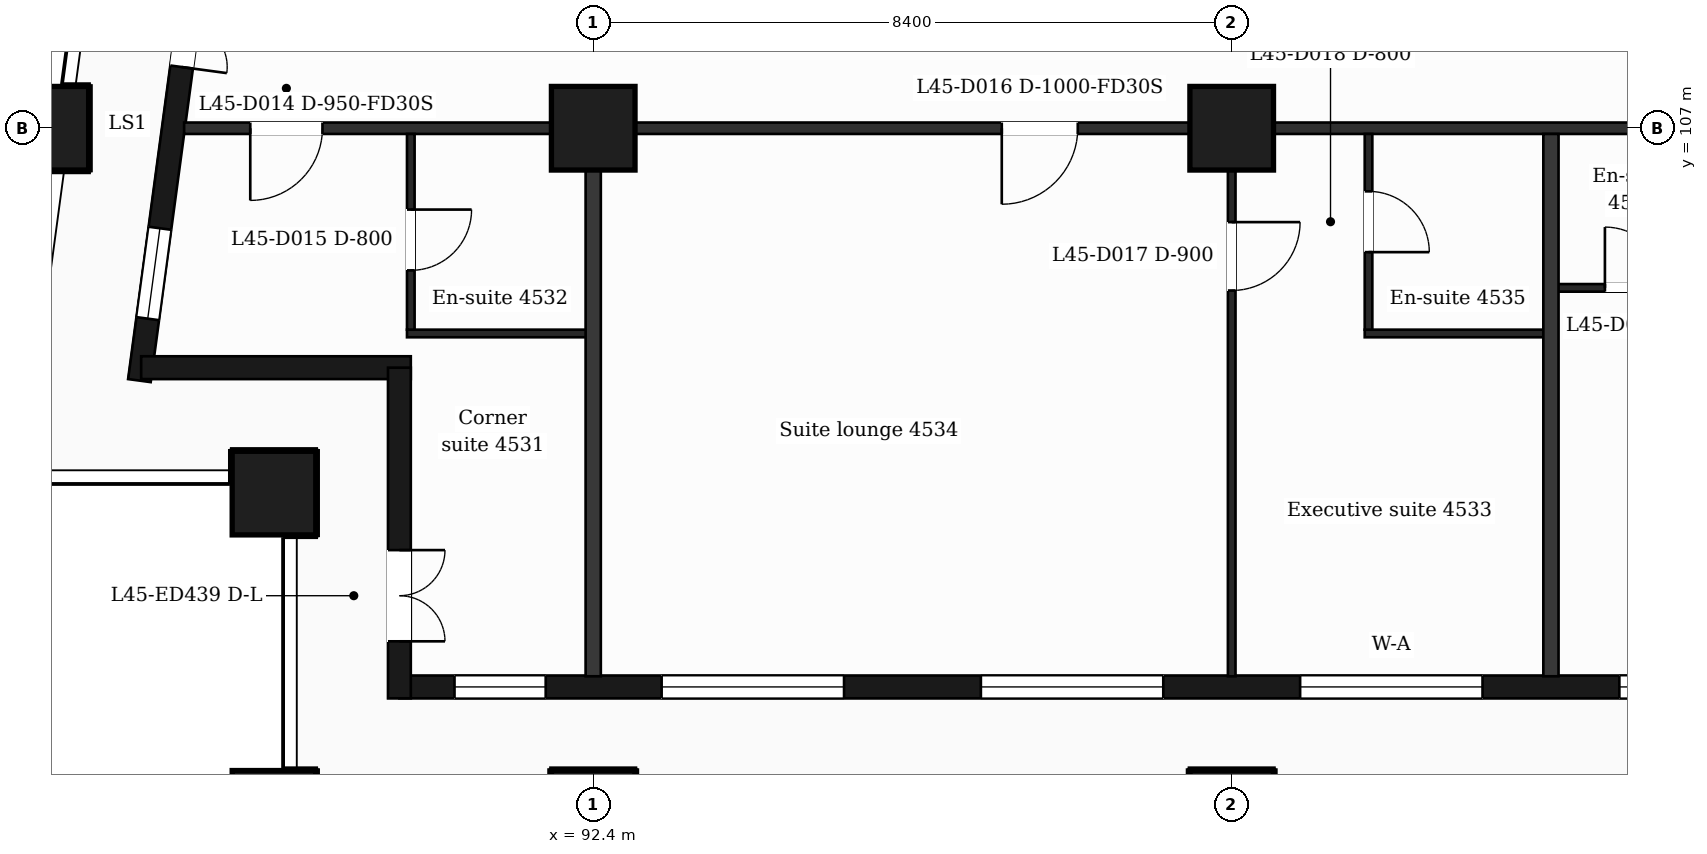
"""IFC4 building model, lengths in metres.
Left out: names, types, materials, properties, quantities, classifications, styles, units other than length and angle.
Written with IfcOpenShell. Run it as: python <this file> out.ifc"""

import sys

from ifc_helpers import new_model, si_unit, direction, frame, frame_2d, origin, origin_2d, place, context, subcontext, project, spatial, rectangle, extrude, element, fill, save


model = new_model("IFC4")
c1 = context("Model", 3, precision=1e-05, world=origin(), true_north=direction((0.0, 1.0)))
c2 = subcontext(c1, "Body", "Model", "MODEL_VIEW")
j1 = project(units=[si_unit("LENGTHUNIT", "METRE"), si_unit("PLANEANGLEUNIT", "RADIAN")], contexts=[c1])
p1 = place(None, origin())
s1 = spatial("IfcSite", under=j1, at=p1, CompositionType="ELEMENT")
p2 = place(p1, origin())
s2 = spatial("IfcBuilding", under=s1, at=p2, CompositionType="ELEMENT")
p3 = place(p2, frame((0.0, 0.0, 188.5)))
s3 = spatial("IfcBuildingStorey", under=s2, at=p3, CompositionType="ELEMENT", Elevation=188.5)
for number, where, z_axis, x_axis in (
    (1, (92.4, 98.0, 0.0), (0.0, 0.0, 1.0), (1.0, 0.0, 0.0)),
    (2, (100.8, 98.0, 0.0), (0.0, 0.0, 1.0), (1.0, 0.0, 0.0)),
    (3, (88.2, 98.0, 0.0), (0.0, 0.0, 1.0), (1.0, 0.0, 0.0)),
    (4, (88.2, 102.2, 0.0), (0.0, 0.0, 1.0), (1.0, 0.0, 0.0)),
    (5, (92.4, 107.0, 0.0), (0.0, 0.0, 1.0), (1.0, 0.0, 0.0)),
    (6, (100.8, 107.0, 0.0), (0.0, 0.0, 1.0), (1.0, 0.0, 0.0)),
    (7, (85.211, 107.0, 0.0), (0.0, 0.0, 1.0), (1.0, 0.0, 0.0)),
):
    element("IfcColumn", number, at=place(p3, frame(where, z_axis=z_axis, x_axis=x_axis)), inside=s3, PredefinedType="COLUMN", context=c2, shape_type="SweptSolid", body=[
        extrude(rectangle(XDim=1.1, YDim=1.1, at=origin_2d()), origin(), (0.0, 0.0, 1.0), 3.7),
    ])
p4 = place(p3, frame((89.85, 99.65, 0.0), z_axis=(0.0, 0.0, 1.0), x_axis=(1.0, 0.0, 0.0)))
e8 = element("IfcWall", 8, at=p4, inside=s3, PredefinedType="SOLIDWALL", context=c2, shape_type="SweptSolid", body=[
    extrude(rectangle(XDim=47.25, YDim=0.3, at=frame_2d((23.625, 0.0))), origin(), (0.0, 0.0, 1.0), 3.25),
])
p5 = place(p4, frame((0.725, 0.0, 0.9)))
e9 = element("IfcOpeningElement", 9, at=p5, cuts=e8, PredefinedType="OPENING", context=c2, shape_type="SweptSolid", body=[
    extrude(rectangle(XDim=1.2, YDim=2.1, at=frame_2d((0.6, 1.05))), frame((0.0, 0.16, 0.0), z_axis=(0.0, -1.0, 0.0), x_axis=(1.0, 0.0, 0.0)), (0.0, 0.0, 1.0), 0.32),
])
p6 = place(p4, frame((3.45, 0.0, 0.9)))
e10 = element("IfcOpeningElement", 10, at=p6, cuts=e8, PredefinedType="OPENING", context=c2, shape_type="SweptSolid", body=[
    extrude(rectangle(XDim=2.4, YDim=2.1, at=frame_2d((1.2, 1.05))), frame((0.0, 0.16, 0.0), z_axis=(0.0, -1.0, 0.0), x_axis=(1.0, 0.0, 0.0)), (0.0, 0.0, 1.0), 0.32),
])
p7 = place(p4, frame((7.65, 0.0, 0.9)))
e11 = element("IfcOpeningElement", 11, at=p7, cuts=e8, PredefinedType="OPENING", context=c2, shape_type="SweptSolid", body=[
    extrude(rectangle(XDim=2.4, YDim=2.1, at=frame_2d((1.2, 1.05))), frame((0.0, 0.16, 0.0), z_axis=(0.0, -1.0, 0.0), x_axis=(1.0, 0.0, 0.0)), (0.0, 0.0, 1.0), 0.32),
])
p8 = place(p4, frame((11.85, 0.0, 0.9)))
e12 = element("IfcOpeningElement", 12, at=p8, cuts=e8, PredefinedType="OPENING", context=c2, shape_type="SweptSolid", body=[
    extrude(rectangle(XDim=2.4, YDim=2.1, at=frame_2d((1.2, 1.05))), frame((0.0, 0.16, 0.0), z_axis=(0.0, -1.0, 0.0), x_axis=(1.0, 0.0, 0.0)), (0.0, 0.0, 1.0), 0.32),
])
p9 = place(p4, frame((16.05, 0.0, 0.9)))
e13 = element("IfcOpeningElement", 13, at=p9, cuts=e8, PredefinedType="OPENING", context=c2, shape_type="SweptSolid", body=[
    extrude(rectangle(XDim=2.4, YDim=2.1, at=frame_2d((1.2, 1.05))), frame((0.0, 0.16, 0.0), z_axis=(0.0, -1.0, 0.0), x_axis=(1.0, 0.0, 0.0)), (0.0, 0.0, 1.0), 0.32),
])
p10 = place(p4, frame((20.25, 0.0, 0.9)))
e14 = element("IfcOpeningElement", 14, at=p10, cuts=e8, PredefinedType="OPENING", context=c2, shape_type="SweptSolid", body=[
    extrude(rectangle(XDim=2.4, YDim=2.1, at=frame_2d((1.2, 1.05))), frame((0.0, 0.16, 0.0), z_axis=(0.0, -1.0, 0.0), x_axis=(1.0, 0.0, 0.0)), (0.0, 0.0, 1.0), 0.32),
])
p11 = place(p4, frame((25.05, 0.0, 0.9)))
e15 = element("IfcOpeningElement", 15, at=p11, cuts=e8, PredefinedType="OPENING", context=c2, shape_type="SweptSolid", body=[
    extrude(rectangle(XDim=1.2, YDim=2.1, at=frame_2d((0.6, 1.05))), frame((0.0, 0.16, 0.0), z_axis=(0.0, -1.0, 0.0), x_axis=(1.0, 0.0, 0.0)), (0.0, 0.0, 1.0), 0.32),
])
p12 = place(p4, frame((29.25, 0.0, 0.9)))
e16 = element("IfcOpeningElement", 16, at=p12, cuts=e8, PredefinedType="OPENING", context=c2, shape_type="SweptSolid", body=[
    extrude(rectangle(XDim=1.2, YDim=2.1, at=frame_2d((0.6, 1.05))), frame((0.0, 0.16, 0.0), z_axis=(0.0, -1.0, 0.0), x_axis=(1.0, 0.0, 0.0)), (0.0, 0.0, 1.0), 0.32),
])
p13 = place(p4, frame((32.55, 0.0, 0.0)))
e17 = element("IfcOpeningElement", 17, at=p13, cuts=e8, PredefinedType="OPENING", context=c2, shape_type="SweptSolid", body=[
    extrude(rectangle(XDim=1.2, YDim=2.4, at=frame_2d((0.6, 1.2))), frame((0.0, 0.16, 0.0), z_axis=(0.0, -1.0, 0.0), x_axis=(1.0, 0.0, 0.0)), (0.0, 0.0, 1.0), 0.32),
])
p14 = place(p4, frame((34.35, 0.0, 0.9)))
e18 = element("IfcOpeningElement", 18, at=p14, cuts=e8, PredefinedType="OPENING", context=c2, shape_type="SweptSolid", body=[
    extrude(rectangle(XDim=1.2, YDim=2.1, at=frame_2d((0.6, 1.05))), frame((0.0, 0.16, 0.0), z_axis=(0.0, -1.0, 0.0), x_axis=(1.0, 0.0, 0.0)), (0.0, 0.0, 1.0), 0.32),
])
p15 = place(p4, frame((37.05, 0.0, 0.9)))
e19 = element("IfcOpeningElement", 19, at=p15, cuts=e8, PredefinedType="OPENING", context=c2, shape_type="SweptSolid", body=[
    extrude(rectangle(XDim=2.4, YDim=2.1, at=frame_2d((1.2, 1.05))), frame((0.0, 0.16, 0.0), z_axis=(0.0, -1.0, 0.0), x_axis=(1.0, 0.0, 0.0)), (0.0, 0.0, 1.0), 0.32),
])
p16 = place(p4, frame((40.95, 0.0, 0.0)))
e20 = element("IfcOpeningElement", 20, at=p16, cuts=e8, PredefinedType="OPENING", context=c2, shape_type="SweptSolid", body=[
    extrude(rectangle(XDim=1.2, YDim=2.4, at=frame_2d((0.6, 1.2))), frame((0.0, 0.16, 0.0), z_axis=(0.0, -1.0, 0.0), x_axis=(1.0, 0.0, 0.0)), (0.0, 0.0, 1.0), 0.32),
])
p17 = place(p4, frame((42.75, 0.0, 0.9)))
e21 = element("IfcOpeningElement", 21, at=p17, cuts=e8, PredefinedType="OPENING", context=c2, shape_type="SweptSolid", body=[
    extrude(rectangle(XDim=1.2, YDim=2.1, at=frame_2d((0.6, 1.05))), frame((0.0, 0.16, 0.0), z_axis=(0.0, -1.0, 0.0), x_axis=(1.0, 0.0, 0.0)), (0.0, 0.0, 1.0), 0.32),
])
p18 = place(p4, frame((45.25, 0.0, 0.9)))
e22 = element("IfcOpeningElement", 22, at=p18, cuts=e8, PredefinedType="OPENING", context=c2, shape_type="SweptSolid", body=[
    extrude(rectangle(XDim=1.2, YDim=2.1, at=frame_2d((0.6, 1.05))), frame((0.0, 0.16, 0.0), z_axis=(0.0, -1.0, 0.0), x_axis=(1.0, 0.0, 0.0)), (0.0, 0.0, 1.0), 0.32),
])
p19 = place(p3, frame((87.334, 110.4, 0.0), z_axis=(0.0, 0.0, 1.0), x_axis=(-0.133437175554, -0.991057273915, 0.0)))
e23 = element("IfcWall", 23, at=p19, inside=s3, PredefinedType="SOLIDWALL", context=c2, shape_type="SweptSolid", body=[
    extrude(rectangle(XDim=6.781, YDim=0.3, at=frame_2d((3.39, 0.0))), origin(), (0.0, 0.0, 1.0), 3.25),
])
p20 = place(p19, frame((1.418, 0.0, 0.0)))
e24 = element("IfcOpeningElement", 24, at=p20, cuts=e23, PredefinedType="OPENING", context=c2, shape_type="SweptSolid", body=[
    extrude(rectangle(XDim=1.2, YDim=2.4, at=frame_2d((0.6, 1.2))), frame((0.0, 0.16, 0.0), z_axis=(0.0, -1.0, 0.0), x_axis=(1.0, 0.0, 0.0)), (0.0, 0.0, 1.0), 0.32),
])
p21 = place(p19, frame((4.758, 0.0, 0.9)))
e25 = element("IfcOpeningElement", 25, at=p21, cuts=e23, PredefinedType="OPENING", context=c2, shape_type="SweptSolid", body=[
    extrude(rectangle(XDim=1.2, YDim=2.1, at=frame_2d((0.6, 1.05))), frame((0.0, 0.16, 0.0), z_axis=(0.0, -1.0, 0.0), x_axis=(1.0, 0.0, 0.0)), (0.0, 0.0, 1.0), 0.32),
])
p22 = place(p3, frame((86.452, 103.85, 0.0), z_axis=(0.0, 0.0, 1.0), x_axis=(1.0, 0.0, 0.0)))
e26 = element("IfcWall", 26, at=p22, inside=s3, PredefinedType="SOLIDWALL", context=c2, shape_type="SweptSolid", body=[
    extrude(rectangle(XDim=3.548, YDim=0.3, at=frame_2d((1.774, 0.0))), origin(), (0.0, 0.0, 1.0), 3.25),
])
p23 = place(p3, frame((89.85, 103.85, 0.0), z_axis=(0.0, 0.0, 1.0), x_axis=(0.0, -1.0, 0.0)))
e27 = element("IfcWall", 27, at=p23, inside=s3, PredefinedType="SOLIDWALL", context=c2, shape_type="SweptSolid", body=[
    extrude(rectangle(XDim=4.35, YDim=0.3, at=frame_2d((2.175, 0.0))), origin(), (0.0, 0.0, 1.0), 3.25),
])
p24 = place(p23, frame((2.4, 0.0, 0.0)))
e28 = element("IfcOpeningElement", 28, at=p24, cuts=e27, PredefinedType="OPENING", context=c2, shape_type="SweptSolid", body=[
    extrude(rectangle(XDim=1.2, YDim=2.4, at=frame_2d((0.6, 1.2))), frame((0.0, 0.16, 0.0), z_axis=(0.0, -1.0, 0.0), x_axis=(1.0, 0.0, 0.0)), (0.0, 0.0, 1.0), 0.32),
])
for number, where, z_axis, x_axis in (
    (29, (89.95, 104.3, 0.0), (0.0, 0.0, 1.0), (1.0, 0.0, 0.0)),
    (30, (102.55, 104.3, 0.0), (0.0, 0.0, 1.0), (1.0, 0.0, 0.0)),
):
    element("IfcWall", number, at=place(p3, frame(where, z_axis=z_axis, x_axis=x_axis)), inside=s3, PredefinedType="PARTITIONING", context=c2, shape_type="SweptSolid", body=[
        extrude(rectangle(XDim=2.45, YDim=0.1, at=frame_2d((1.225, 0.0))), origin(), (0.0, 0.0, 1.0), 3.25),
    ])
p25 = place(p3, frame((105.0, 104.9, 0.0), z_axis=(0.0, 0.0, 1.0), x_axis=(1.0, 0.0, 0.0)))
e31 = element("IfcWall", 31, at=p25, inside=s3, PredefinedType="PARTITIONING", context=c2, shape_type="SweptSolid", body=[
    extrude(rectangle(XDim=2.15, YDim=0.1, at=frame_2d((1.075, 0.0))), origin(), (0.0, 0.0, 1.0), 3.25),
])
p26 = place(p25, frame((0.71, 0.0, 0.0)))
e32 = element("IfcOpeningElement", 32, at=p26, cuts=e31, PredefinedType="OPENING", context=c2, shape_type="SweptSolid", body=[
    extrude(rectangle(XDim=0.8, YDim=2.1, at=frame_2d((0.4, 1.05))), frame((0.0, 0.06, 0.0), z_axis=(0.0, -1.0, 0.0), x_axis=(1.0, 0.0, 0.0)), (0.0, 0.0, 1.0), 0.12),
])
p27 = place(p3, frame((87.018, 107.0, 0.0), z_axis=(0.0, 0.0, 1.0), x_axis=(1.0, 0.0, 0.0)))
e33 = element("IfcWall", 33, at=p27, inside=s3, PredefinedType="PARTITIONING", context=c2, shape_type="SweptSolid", body=[
    extrude(rectangle(XDim=52.765, YDim=0.15, at=frame_2d((26.382, 0.0))), origin(), (0.0, 0.0, 1.0), 3.25),
])
p28 = place(p27, frame((0.87, 0.0, 0.0)))
e34 = element("IfcOpeningElement", 34, at=p28, cuts=e33, PredefinedType="OPENING", context=c2, shape_type="SweptSolid", body=[
    extrude(rectangle(XDim=0.95, YDim=2.1, at=frame_2d((0.475, 1.05))), frame((0.0, 0.085, 0.0), z_axis=(0.0, -1.0, 0.0), x_axis=(1.0, 0.0, 0.0)), (0.0, 0.0, 1.0), 0.17),
])
p29 = place(p27, frame((10.757, 0.0, 0.0)))
e35 = element("IfcOpeningElement", 35, at=p29, cuts=e33, PredefinedType="OPENING", context=c2, shape_type="SweptSolid", body=[
    extrude(rectangle(XDim=1.0, YDim=2.1, at=frame_2d((0.5, 1.05))), frame((0.0, 0.085, 0.0), z_axis=(0.0, -1.0, 0.0), x_axis=(1.0, 0.0, 0.0)), (0.0, 0.0, 1.0), 0.17),
])
p30 = place(p27, frame((20.432, 0.0, 0.0)))
e36 = element("IfcOpeningElement", 36, at=p30, cuts=e33, PredefinedType="OPENING", context=c2, shape_type="SweptSolid", body=[
    extrude(rectangle(XDim=0.95, YDim=2.1, at=frame_2d((0.475, 1.05))), frame((0.0, 0.085, 0.0), z_axis=(0.0, -1.0, 0.0), x_axis=(1.0, 0.0, 0.0)), (0.0, 0.0, 1.0), 0.17),
])
p31 = place(p27, frame((27.752, 0.0, 0.0)))
e37 = element("IfcOpeningElement", 37, at=p31, cuts=e33, PredefinedType="OPENING", context=c2, shape_type="SweptSolid", body=[
    extrude(rectangle(XDim=0.95, YDim=2.1, at=frame_2d((0.475, 1.05))), frame((0.0, 0.085, 0.0), z_axis=(0.0, -1.0, 0.0), x_axis=(1.0, 0.0, 0.0)), (0.0, 0.0, 1.0), 0.17),
])
p32 = place(p27, frame((33.557, 0.0, 0.0)))
e38 = element("IfcOpeningElement", 38, at=p32, cuts=e33, PredefinedType="OPENING", context=c2, shape_type="SweptSolid", body=[
    extrude(rectangle(XDim=0.95, YDim=2.1, at=frame_2d((0.475, 1.05))), frame((0.0, 0.085, 0.0), z_axis=(0.0, -1.0, 0.0), x_axis=(1.0, 0.0, 0.0)), (0.0, 0.0, 1.0), 0.17),
])
p33 = place(p27, frame((35.057, 0.0, 0.0)))
e39 = element("IfcOpeningElement", 39, at=p33, cuts=e33, PredefinedType="OPENING", context=c2, shape_type="SweptSolid", body=[
    extrude(rectangle(XDim=0.95, YDim=2.1, at=frame_2d((0.475, 1.05))), frame((0.0, 0.085, 0.0), z_axis=(0.0, -1.0, 0.0), x_axis=(1.0, 0.0, 0.0)), (0.0, 0.0, 1.0), 0.17),
])
p34 = place(p27, frame((45.407, 0.0, 0.0)))
e40 = element("IfcOpeningElement", 40, at=p34, cuts=e33, PredefinedType="OPENING", context=c2, shape_type="SweptSolid", body=[
    extrude(rectangle(XDim=1.0, YDim=2.1, at=frame_2d((0.5, 1.05))), frame((0.0, 0.085, 0.0), z_axis=(0.0, -1.0, 0.0), x_axis=(1.0, 0.0, 0.0)), (0.0, 0.0, 1.0), 0.17),
])
p35 = place(p27, frame((49.285, 0.0, 0.0)))
e41 = element("IfcOpeningElement", 41, at=p35, cuts=e33, PredefinedType="OPENING", context=c2, shape_type="SweptSolid", body=[
    extrude(rectangle(XDim=0.95, YDim=2.1, at=frame_2d((0.475, 1.05))), frame((0.0, 0.085, 0.0), z_axis=(0.0, -1.0, 0.0), x_axis=(1.0, 0.0, 0.0)), (0.0, 0.0, 1.0), 0.17),
])
p36 = place(p3, frame((90.0, 104.35, 0.0), z_axis=(0.0, 0.0, 1.0), x_axis=(0.0, 1.0, 0.0)))
e42 = element("IfcWall", 42, at=p36, inside=s3, PredefinedType="PARTITIONING", context=c2, shape_type="SweptSolid", body=[
    extrude(rectangle(XDim=2.575, YDim=0.1, at=frame_2d((1.288, 0.0))), origin(), (0.0, 0.0, 1.0), 3.25),
])
p37 = place(p36, frame((0.78, 0.0, 0.0)))
e43 = element("IfcOpeningElement", 43, at=p37, cuts=e42, PredefinedType="OPENING", context=c2, shape_type="SweptSolid", body=[
    extrude(rectangle(XDim=0.8, YDim=2.1, at=frame_2d((0.4, 1.05))), frame((0.0, 0.06, 0.0), z_axis=(0.0, -1.0, 0.0), x_axis=(1.0, 0.0, 0.0)), (0.0, 0.0, 1.0), 0.12),
])
p38 = place(p3, frame((92.4, 99.79, 0.0), z_axis=(0.0, 0.0, 1.0), x_axis=(0.0, 1.0, 0.0)))
e44 = element("IfcWall", 44, at=p38, inside=s3, PredefinedType="PARTITIONING", context=c2, shape_type="SweptSolid", body=[
    extrude(rectangle(XDim=7.135, YDim=0.2, at=frame_2d((3.567, 0.0))), origin(), (0.0, 0.0, 1.0), 3.25),
])
p39 = place(p3, frame((100.8, 99.79, 0.0), z_axis=(0.0, 0.0, 1.0), x_axis=(0.0, 1.0, 0.0)))
e45 = element("IfcWall", 45, at=p39, inside=s3, PredefinedType="PARTITIONING", context=c2, shape_type="SweptSolid", body=[
    extrude(rectangle(XDim=7.135, YDim=0.1, at=frame_2d((3.567, 0.0))), origin(), (0.0, 0.0, 1.0), 3.25),
])
p40 = place(p39, frame((5.075, 0.0, 0.0)))
e46 = element("IfcOpeningElement", 46, at=p40, cuts=e45, PredefinedType="OPENING", context=c2, shape_type="SweptSolid", body=[
    extrude(rectangle(XDim=0.9, YDim=2.1, at=frame_2d((0.45, 1.05))), frame((0.0, 0.06, 0.0), z_axis=(0.0, -1.0, 0.0), x_axis=(1.0, 0.0, 0.0)), (0.0, 0.0, 1.0), 0.12),
])
p41 = place(p3, frame((102.6, 104.35, 0.0), z_axis=(0.0, 0.0, 1.0), x_axis=(0.0, 1.0, 0.0)))
e47 = element("IfcWall", 47, at=p41, inside=s3, PredefinedType="PARTITIONING", context=c2, shape_type="SweptSolid", body=[
    extrude(rectangle(XDim=2.575, YDim=0.1, at=frame_2d((1.288, 0.0))), origin(), (0.0, 0.0, 1.0), 3.25),
])
p42 = place(p41, frame((1.02, 0.0, 0.0)))
e48 = element("IfcOpeningElement", 48, at=p42, cuts=e47, PredefinedType="OPENING", context=c2, shape_type="SweptSolid", body=[
    extrude(rectangle(XDim=0.8, YDim=2.1, at=frame_2d((0.4, 1.05))), frame((0.0, 0.06, 0.0), z_axis=(0.0, -1.0, 0.0), x_axis=(1.0, 0.0, 0.0)), (0.0, 0.0, 1.0), 0.12),
])
p43 = place(p3, frame((105.0, 99.79, 0.0), z_axis=(0.0, 0.0, 1.0), x_axis=(0.0, 1.0, 0.0)))
e49 = element("IfcWall", 49, at=p43, inside=s3, PredefinedType="PARTITIONING", context=c2, shape_type="SweptSolid", body=[
    extrude(rectangle(XDim=7.135, YDim=0.2, at=frame_2d((3.567, 0.0))), origin(), (0.0, 0.0, 1.0), 3.25),
])
p44 = place(p5, origin())
e50 = element("IfcWindow", 50, at=p44, inside=s3, PartitioningType="SINGLE_PANEL", PredefinedType="WINDOW", context=c2, shape_type="SweptSolid", body=[
    extrude(rectangle(XDim=1.2, YDim=2.1, at=frame_2d((0.6, 1.05))), frame((0.0, 0.03, 0.0), z_axis=(0.0, -1.0, 0.0), x_axis=(1.0, 0.0, 0.0)), (0.0, 0.0, 1.0), 0.06),
])
fill(e9, e50)
p45 = place(p6, origin())
e51 = element("IfcWindow", 51, at=p45, inside=s3, PartitioningType="SINGLE_PANEL", PredefinedType="WINDOW", context=c2, shape_type="SweptSolid", body=[
    extrude(rectangle(XDim=2.4, YDim=2.1, at=frame_2d((1.2, 1.05))), frame((0.0, 0.03, 0.0), z_axis=(0.0, -1.0, 0.0), x_axis=(1.0, 0.0, 0.0)), (0.0, 0.0, 1.0), 0.06),
])
fill(e10, e51)
p46 = place(p7, origin())
e52 = element("IfcWindow", 52, at=p46, inside=s3, PartitioningType="SINGLE_PANEL", PredefinedType="WINDOW", context=c2, shape_type="SweptSolid", body=[
    extrude(rectangle(XDim=2.4, YDim=2.1, at=frame_2d((1.2, 1.05))), frame((0.0, 0.03, 0.0), z_axis=(0.0, -1.0, 0.0), x_axis=(1.0, 0.0, 0.0)), (0.0, 0.0, 1.0), 0.06),
])
fill(e11, e52)
p47 = place(p8, origin())
e53 = element("IfcWindow", 53, at=p47, inside=s3, PartitioningType="SINGLE_PANEL", PredefinedType="WINDOW", context=c2, shape_type="SweptSolid", body=[
    extrude(rectangle(XDim=2.4, YDim=2.1, at=frame_2d((1.2, 1.05))), frame((0.0, 0.03, 0.0), z_axis=(0.0, -1.0, 0.0), x_axis=(1.0, 0.0, 0.0)), (0.0, 0.0, 1.0), 0.06),
])
fill(e12, e53)
p48 = place(p9, origin())
e54 = element("IfcWindow", 54, at=p48, inside=s3, PartitioningType="SINGLE_PANEL", PredefinedType="WINDOW", context=c2, shape_type="SweptSolid", body=[
    extrude(rectangle(XDim=2.4, YDim=2.1, at=frame_2d((1.2, 1.05))), frame((0.0, 0.03, 0.0), z_axis=(0.0, -1.0, 0.0), x_axis=(1.0, 0.0, 0.0)), (0.0, 0.0, 1.0), 0.06),
])
fill(e13, e54)
p49 = place(p20, origin())
e55 = element("IfcDoor", 55, at=p49, inside=s3, OperationType="DOUBLE_DOOR_SINGLE_SWING", PredefinedType="DOOR", context=c2, shape_type="SweptSolid", body=[
    extrude(rectangle(XDim=1.2, YDim=2.4, at=frame_2d((0.6, 1.2))), frame((0.0, 0.025, 0.0), z_axis=(0.0, -1.0, 0.0), x_axis=(1.0, 0.0, 0.0)), (0.0, 0.0, 1.0), 0.05),
])
fill(e24, e55)
p50 = place(p21, origin())
e56 = element("IfcWindow", 56, at=p50, inside=s3, PartitioningType="SINGLE_PANEL", PredefinedType="WINDOW", context=c2, shape_type="SweptSolid", body=[
    extrude(rectangle(XDim=1.2, YDim=2.1, at=frame_2d((0.6, 1.05))), frame((0.0, 0.03, 0.0), z_axis=(0.0, -1.0, 0.0), x_axis=(1.0, 0.0, 0.0)), (0.0, 0.0, 1.0), 0.06),
])
fill(e25, e56)
p51 = place(p24, origin())
e57 = element("IfcDoor", 57, at=p51, inside=s3, OperationType="DOUBLE_DOOR_SINGLE_SWING", PredefinedType="DOOR", context=c2, shape_type="SweptSolid", body=[
    extrude(rectangle(XDim=1.2, YDim=2.4, at=frame_2d((0.6, 1.2))), frame((0.0, 0.025, 0.0), z_axis=(0.0, -1.0, 0.0), x_axis=(1.0, 0.0, 0.0)), (0.0, 0.0, 1.0), 0.05),
])
fill(e28, e57)
p52 = place(p28, origin())
e58 = element("IfcDoor", 58, at=p52, inside=s3, OperationType="SINGLE_SWING_LEFT", PredefinedType="DOOR", context=c2, shape_type="SweptSolid", body=[
    extrude(rectangle(XDim=0.95, YDim=2.1, at=frame_2d((0.475, 1.05))), frame((0.0, 0.025, 0.0), z_axis=(0.0, -1.0, 0.0), x_axis=(1.0, 0.0, 0.0)), (0.0, 0.0, 1.0), 0.05),
])
fill(e34, e58)
p53 = place(p37, origin())
e59 = element("IfcDoor", 59, at=p53, inside=s3, OperationType="SINGLE_SWING_RIGHT", PredefinedType="DOOR", context=c2, shape_type="SweptSolid", body=[
    extrude(rectangle(XDim=0.8, YDim=2.1, at=frame_2d((0.4, 1.05))), frame((0.0, 0.025, 0.0), z_axis=(0.0, -1.0, 0.0), x_axis=(1.0, 0.0, 0.0)), (0.0, 0.0, 1.0), 0.05),
])
fill(e43, e59)
p54 = place(p29, origin())
e60 = element("IfcDoor", 60, at=p54, inside=s3, OperationType="SINGLE_SWING_LEFT", PredefinedType="DOOR", context=c2, shape_type="SweptSolid", body=[
    extrude(rectangle(XDim=1.0, YDim=2.1, at=frame_2d((0.5, 1.05))), frame((0.0, 0.025, 0.0), z_axis=(0.0, -1.0, 0.0), x_axis=(1.0, 0.0, 0.0)), (0.0, 0.0, 1.0), 0.05),
])
fill(e35, e60)
p55 = place(p40, origin())
e61 = element("IfcDoor", 61, at=p55, inside=s3, OperationType="SINGLE_SWING_RIGHT", PredefinedType="DOOR", context=c2, shape_type="SweptSolid", body=[
    extrude(rectangle(XDim=0.9, YDim=2.1, at=frame_2d((0.45, 1.05))), frame((0.0, 0.025, 0.0), z_axis=(0.0, -1.0, 0.0), x_axis=(1.0, 0.0, 0.0)), (0.0, 0.0, 1.0), 0.05),
])
fill(e46, e61)
p56 = place(p42, origin())
e62 = element("IfcDoor", 62, at=p56, inside=s3, OperationType="SINGLE_SWING_LEFT", PredefinedType="DOOR", context=c2, shape_type="SweptSolid", body=[
    extrude(rectangle(XDim=0.8, YDim=2.1, at=frame_2d((0.4, 1.05))), frame((0.0, 0.025, 0.0), z_axis=(0.0, -1.0, 0.0), x_axis=(1.0, 0.0, 0.0)), (0.0, 0.0, 1.0), 0.05),
])
fill(e48, e62)
p57 = place(p26, origin())
e63 = element("IfcDoor", 63, at=p57, inside=s3, OperationType="SINGLE_SWING_LEFT", PredefinedType="DOOR", context=c2, shape_type="SweptSolid", body=[
    extrude(rectangle(XDim=0.8, YDim=2.1, at=frame_2d((0.4, 1.05))), frame((0.0, 0.025, 0.0), z_axis=(0.0, -1.0, 0.0), x_axis=(1.0, 0.0, 0.0)), (0.0, 0.0, 1.0), 0.05),
])
fill(e32, e63)
save(model, sys.argv[1])
